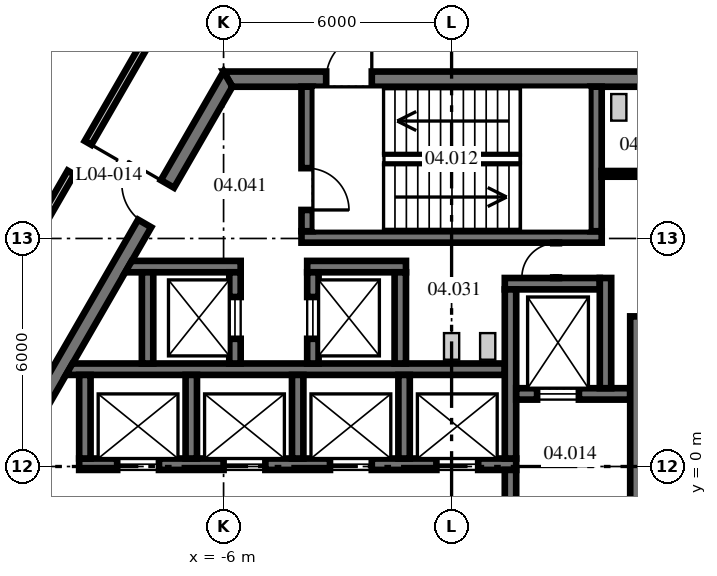
"""IFC4 building model, lengths in metres.
Left out: names, types, materials, properties, quantities, classifications, styles, units other than length and angle.
Written with IfcOpenShell. Run it as: python <this file> out.ifc"""

import sys

from ifc_helpers import new_model, si_unit, direction, frame, frame_2d, origin, place, context, subcontext, project, spatial, polyline, rectangle, outline, extrude, source, transform, mapped, element, fill, save


model = new_model("IFC4")
c1 = context("Model", 3, precision=1e-05, world=origin(), true_north=direction((0.0, 1.0)))
c2 = subcontext(c1, "Body", "Model", "MODEL_VIEW")
j1 = project(units=[si_unit("LENGTHUNIT", "METRE"), si_unit("PLANEANGLEUNIT", "RADIAN")], contexts=[c1])
p1 = place(None, origin())
s1 = spatial("IfcSite", under=j1, at=p1, CompositionType="ELEMENT")
p2 = place(p1, origin())
s2 = spatial("IfcBuilding", under=s1, at=p2, CompositionType="ELEMENT")
p3 = place(p2, frame((0.0, 0.0, 20.3)))
s3 = spatial("IfcBuildingStorey", under=s2, at=p3, CompositionType="ELEMENT", Elevation=20.3)
m1 = source(origin(), c2, "Body", "SweptSolid", [
    extrude(outline(polyline([(-0.115, -0.2), (11.885, -0.2), (11.654, 0.2), (0.115, 0.2), (-0.115, -0.2)])), origin(), (0.0, 0.0, 1.0), 4.1),
])
p4 = place(p3, frame((5.885, 10.192, 0.0), z_axis=(0.0, 0.0, 1.0), x_axis=(-1.0, 0.0, 0.0)))
e1 = element("IfcWall", 1, at=p4, inside=s3, PredefinedType="SHEAR", context=c2, shape_type="MappedRepresentation", body=[
    mapped(m1, transform((0.0, 0.0, 0.0), scale=1.0)),
])
p5 = place(p4, frame((7.985, 0.0, 0.0)))
e2 = element("IfcOpeningElement", 2, at=p5, cuts=e1, PredefinedType="OPENING", context=c2, shape_type="SweptSolid", body=[
    extrude(rectangle(XDim=1.2, YDim=2.1, at=frame_2d((0.6, 1.05))), frame((0.0, 0.21, 0.0), z_axis=(0.0, -1.0, 0.0), x_axis=(1.0, 0.0, 0.0)), (0.0, 0.0, 1.0), 0.42),
])
p6 = place(p3, frame((-5.885, 10.192, 0.0), z_axis=(0.0, 0.0, 1.0), x_axis=(-0.499996592174, -0.866027371285, 0.0)))
e3 = element("IfcWall", 3, at=p6, inside=s3, PredefinedType="SHEAR", context=c2, shape_type="MappedRepresentation", body=[
    mapped(m1, transform((0.0, 0.0, 0.0), scale=1.0)),
])
p7 = place(p6, frame((3.185, 0.0, 0.0)))
e4 = element("IfcOpeningElement", 4, at=p7, cuts=e3, PredefinedType="OPENING", context=c2, shape_type="SweptSolid", body=[
    extrude(rectangle(XDim=1.2, YDim=2.1, at=frame_2d((0.6, 1.05))), frame((0.0, 0.21, 0.0), z_axis=(0.0, -1.0, 0.0), x_axis=(1.0, 0.0, 0.0)), (0.0, 0.0, 1.0), 0.42),
])
p8 = place(p3, frame((-11.769, 0.0, 0.0), z_axis=(0.0, 0.0, 1.0), x_axis=(0.499996592174, -0.866027371285, 0.0)))
e5 = element("IfcWall", 5, at=p8, inside=s3, PredefinedType="SHEAR", context=c2, shape_type="MappedRepresentation", body=[
    mapped(m1, transform((0.0, 0.0, 0.0), scale=1.0)),
])
p9 = place(p8, frame((1.405, 0.0, 0.0)))
e6 = element("IfcOpeningElement", 6, at=p9, cuts=e5, PredefinedType="OPENING", context=c2, shape_type="SweptSolid", body=[
    extrude(rectangle(XDim=1.8, YDim=2.1, at=frame_2d((0.9, 1.05))), frame((0.0, 0.21, 0.0), z_axis=(0.0, -1.0, 0.0), x_axis=(1.0, 0.0, 0.0)), (0.0, 0.0, 1.0), 0.42),
])
p10 = place(p8, frame((7.915, 0.0, 0.0)))
e7 = element("IfcOpeningElement", 7, at=p10, cuts=e5, PredefinedType="OPENING", context=c2, shape_type="SweptSolid", body=[
    extrude(rectangle(XDim=1.2, YDim=2.1, at=frame_2d((0.6, 1.05))), frame((0.0, 0.21, 0.0), z_axis=(0.0, -1.0, 0.0), x_axis=(1.0, 0.0, 0.0)), (0.0, 0.0, 1.0), 0.42),
])
m2 = source(origin(), c2, "Body", "SweptSolid", [
    extrude(rectangle(XDim=11.5, YDim=0.3, at=frame_2d((5.75, 0.0))), origin(), (0.0, 0.0, 1.0), 4.1),
])
p11 = place(p3, frame((-9.8, 0.06, 0.0), z_axis=(0.0, 0.0, 1.0), x_axis=(1.0, 0.0, 0.0)))
e8 = element("IfcWall", 8, at=p11, inside=s3, PredefinedType="SHEAR", context=c2, shape_type="MappedRepresentation", body=[
    mapped(m2, transform((0.0, 0.0, 0.0), scale=1.0)),
])
p12 = place(p11, frame((1.0, 0.0, 0.0)))
e9 = element("IfcOpeningElement", 9, at=p12, cuts=e8, PredefinedType="OPENING", context=c2, shape_type="SweptSolid", body=[
    extrude(rectangle(XDim=1.1, YDim=2.1, at=frame_2d((0.55, 1.05))), frame((0.0, 0.16, 0.0), z_axis=(0.0, -1.0, 0.0), x_axis=(1.0, 0.0, 0.0)), (0.0, 0.0, 1.0), 0.32),
])
p13 = place(p11, frame((3.8, 0.0, 0.0)))
e10 = element("IfcOpeningElement", 10, at=p13, cuts=e8, PredefinedType="OPENING", context=c2, shape_type="SweptSolid", body=[
    extrude(rectangle(XDim=1.1, YDim=2.1, at=frame_2d((0.55, 1.05))), frame((0.0, 0.16, 0.0), z_axis=(0.0, -1.0, 0.0), x_axis=(1.0, 0.0, 0.0)), (0.0, 0.0, 1.0), 0.32),
])
p14 = place(p11, frame((6.6, 0.0, 0.0)))
e11 = element("IfcOpeningElement", 11, at=p14, cuts=e8, PredefinedType="OPENING", context=c2, shape_type="SweptSolid", body=[
    extrude(rectangle(XDim=1.1, YDim=2.1, at=frame_2d((0.55, 1.05))), frame((0.0, 0.16, 0.0), z_axis=(0.0, -1.0, 0.0), x_axis=(1.0, 0.0, 0.0)), (0.0, 0.0, 1.0), 0.32),
])
p15 = place(p11, frame((9.4, 0.0, 0.0)))
e12 = element("IfcOpeningElement", 12, at=p15, cuts=e8, PredefinedType="OPENING", context=c2, shape_type="SweptSolid", body=[
    extrude(rectangle(XDim=1.1, YDim=2.1, at=frame_2d((0.55, 1.05))), frame((0.0, 0.16, 0.0), z_axis=(0.0, -1.0, 0.0), x_axis=(1.0, 0.0, 0.0)), (0.0, 0.0, 1.0), 0.32),
])
m3 = source(origin(), c2, "Body", "SweptSolid", [
    extrude(outline(polyline([(11.2, -0.15), (-0.349, -0.15), (-0.176, 0.15), (11.2, 0.15), (11.2, -0.15)])), origin(), (0.0, 0.0, 1.0), 4.1),
])
p16 = place(p3, frame((-9.8, 2.56, 0.0), z_axis=(0.0, 0.0, 1.0), x_axis=(1.0, 0.0, 0.0)))
e13 = element("IfcWall", 13, at=p16, inside=s3, PredefinedType="SHEAR", context=c2, shape_type="MappedRepresentation", body=[
    mapped(m3, transform((0.0, 0.0, 0.0), scale=1.0)),
])
m4 = source(origin(), c2, "Body", "SweptSolid", [
    extrude(rectangle(XDim=2.5, YDim=0.3, at=frame_2d((1.25, 0.0))), origin(), (0.0, 0.0, 1.0), 4.1),
])
p17 = place(p3, frame((1.4, 4.81, 0.0), z_axis=(0.0, 0.0, 1.0), x_axis=(1.0, 0.0, 0.0)))
e14 = element("IfcWall", 14, at=p17, inside=s3, PredefinedType="SHEAR", context=c2, shape_type="MappedRepresentation", body=[
    mapped(m4, transform((0.0, 0.0, 0.0), scale=1.0)),
])
m5 = source(origin(), c2, "Body", "SweptSolid", [
    extrude(rectangle(XDim=4.45, YDim=0.3, at=frame_2d((2.225, 0.0))), origin(), (0.0, 0.0, 1.0), 4.1),
])
p18 = place(p3, frame((1.55, 0.21, 0.0), z_axis=(0.0, 0.0, 1.0), x_axis=(0.0, 1.0, 0.0)))
e15 = element("IfcWall", 15, at=p18, inside=s3, PredefinedType="SHEAR", context=c2, shape_type="MappedRepresentation", body=[
    mapped(m5, transform((0.0, 0.0, 0.0), scale=1.0)),
])
m6 = source(origin(), c2, "Body", "SweptSolid", [
    extrude(rectangle(XDim=3.0, YDim=0.3, at=frame_2d((1.5, 0.0))), origin(), (0.0, 0.0, 1.0), 4.1),
])
p19 = place(p3, frame((1.7, 1.91, 0.0), z_axis=(0.0, 0.0, 1.0), x_axis=(1.0, 0.0, 0.0)))
e16 = element("IfcWall", 16, at=p19, inside=s3, PredefinedType="SHEAR", context=c2, shape_type="MappedRepresentation", body=[
    mapped(m6, transform((0.0, 0.0, 0.0), scale=1.0)),
])
p20 = place(p19, frame((0.55, 0.0, 0.0)))
e17 = element("IfcOpeningElement", 17, at=p20, cuts=e16, PredefinedType="OPENING", context=c2, shape_type="SweptSolid", body=[
    extrude(rectangle(XDim=1.1, YDim=2.1, at=frame_2d((0.55, 1.05))), frame((0.0, 0.16, 0.0), z_axis=(0.0, -1.0, 0.0), x_axis=(1.0, 0.0, 0.0)), (0.0, 0.0, 1.0), 0.32),
])
m7 = source(origin(), c2, "Body", "SweptSolid", [
    extrude(rectangle(XDim=2.9, YDim=0.3, at=frame_2d((1.45, 0.0))), origin(), (0.0, 0.0, 1.0), 4.1),
])
p21 = place(p3, frame((4.05, 2.06, 0.0), z_axis=(0.0, 0.0, 1.0), x_axis=(0.0, 1.0, 0.0)))
e18 = element("IfcWall", 18, at=p21, inside=s3, PredefinedType="SHEAR", context=c2, shape_type="MappedRepresentation", body=[
    mapped(m7, transform((0.0, 0.0, 0.0), scale=1.0)),
])
m8 = source(origin(), c2, "Body", "SweptSolid", [
    extrude(rectangle(XDim=2.2, YDim=0.3, at=frame_2d((1.1, 0.0))), origin(), (0.0, 0.0, 1.0), 4.1),
])
p22 = place(p3, frame((-9.65, 0.21, 0.0), z_axis=(0.0, 0.0, 1.0), x_axis=(0.0, 1.0, 0.0)))
e19 = element("IfcWall", 19, at=p22, inside=s3, PredefinedType="SHEAR", context=c2, shape_type="MappedRepresentation", body=[
    mapped(m8, transform((0.0, 0.0, 0.0), scale=1.0)),
])
p23 = place(p3, frame((1.55, -3.09, 0.0), z_axis=(0.0, 0.0, 1.0), x_axis=(0.0, 1.0, 0.0)))
e20 = element("IfcWall", 20, at=p23, inside=s3, PredefinedType="SHEAR", context=c2, shape_type="MappedRepresentation", body=[
    mapped(m6, transform((0.0, 0.0, 0.0), scale=1.0)),
])
p24 = place(p23, frame((0.9, 0.0, 0.0)))
e21 = element("IfcOpeningElement", 21, at=p24, cuts=e20, PredefinedType="OPENING", context=c2, shape_type="SweptSolid", body=[
    extrude(rectangle(XDim=1.2, YDim=2.1, at=frame_2d((0.6, 1.05))), frame((0.0, 0.16, 0.0), z_axis=(0.0, -1.0, 0.0), x_axis=(1.0, 0.0, 0.0)), (0.0, 0.0, 1.0), 0.32),
])
m9 = source(origin(), c2, "Body", "SweptSolid", [
    extrude(outline(polyline([(-0.15, -0.15), (9.99, -0.15), (9.99, 0.15), (0.15, 0.15), (-0.15, -0.15)])), origin(), (0.0, 0.0, 1.0), 4.1),
])
p25 = place(p3, frame((4.85, -6.04, 0.0), z_axis=(0.0, 0.0, 1.0), x_axis=(0.0, 1.0, 0.0)))
e22 = element("IfcWall", 22, at=p25, inside=s3, PredefinedType="SHEAR", context=c2, shape_type="MappedRepresentation", body=[
    mapped(m9, transform((0.0, 0.0, 0.0), scale=1.0)),
])
p26 = place(p25, frame((3.19, 0.0, 0.0)))
e23 = element("IfcOpeningElement", 23, at=p26, cuts=e22, PredefinedType="OPENING", context=c2, shape_type="SweptSolid", body=[
    extrude(rectangle(XDim=1.1, YDim=2.1, at=frame_2d((0.55, 1.05))), frame((0.0, 0.16, 0.0), z_axis=(0.0, -1.0, 0.0), x_axis=(1.0, 0.0, 0.0)), (0.0, 0.0, 1.0), 0.32),
])
m10 = source(origin(), c2, "Body", "SweptSolid", [
    extrude(rectangle(XDim=7.9, YDim=0.3, at=frame_2d((3.95, 0.0))), origin(), (0.0, 0.0, 1.0), 4.1),
])
p27 = place(p3, frame((-3.95, 6.04, 0.0), z_axis=(0.0, 0.0, 1.0), x_axis=(1.0, 0.0, 0.0)))
e24 = element("IfcWall", 24, at=p27, inside=s3, PredefinedType="SHEAR", context=c2, shape_type="MappedRepresentation", body=[
    mapped(m10, transform((0.0, 0.0, 0.0), scale=1.0)),
])
m11 = source(origin(), c2, "Body", "SweptSolid", [
    extrude(outline(polyline([(0.0, -0.15), (0.0, 0.15), (3.804, 0.15), (3.804, -0.15), (0.0, -0.15)])), origin(), (0.0, 0.0, 1.0), 4.1),
])
p28 = place(p3, frame((-3.8, 6.19, 0.0), z_axis=(0.0, 0.0, 1.0), x_axis=(0.0, 1.0, 0.0)))
e25 = element("IfcWall", 25, at=p28, inside=s3, PredefinedType="SHEAR", context=c2, shape_type="MappedRepresentation", body=[
    mapped(m11, transform((0.0, 0.0, 0.0), scale=1.0)),
])
p29 = place(p28, frame((0.56, 0.0, 0.0)))
e26 = element("IfcOpeningElement", 26, at=p29, cuts=e25, PredefinedType="OPENING", context=c2, shape_type="SweptSolid", body=[
    extrude(rectangle(XDim=1.1, YDim=2.1, at=frame_2d((0.55, 1.05))), frame((0.0, 0.16, 0.0), z_axis=(0.0, -1.0, 0.0), x_axis=(1.0, 0.0, 0.0)), (0.0, 0.0, 1.0), 0.32),
])
p30 = place(p3, frame((3.8, 6.19, 0.0), z_axis=(0.0, 0.0, 1.0), x_axis=(0.0, 1.0, 0.0)))
e27 = element("IfcWall", 27, at=p30, inside=s3, PredefinedType="SHEAR", context=c2, shape_type="MappedRepresentation", body=[
    mapped(m11, transform((0.0, 0.0, 0.0), scale=1.0)),
])
m12 = source(origin(), c2, "Body", "SweptSolid", [
    extrude(outline(polyline([(2.6, -0.15), (-0.44, -0.15), (-0.267, 0.15), (2.6, 0.15), (2.6, -0.15)])), origin(), (0.0, 0.0, 1.0), 4.1),
])
p31 = place(p3, frame((-8.15, 5.26, 0.0), z_axis=(0.0, 0.0, 1.0), x_axis=(1.0, 0.0, 0.0)))
e28 = element("IfcWall", 28, at=p31, inside=s3, PredefinedType="SHEAR", context=c2, shape_type="MappedRepresentation", body=[
    mapped(m12, transform((0.0, 0.0, 0.0), scale=1.0)),
])
m13 = source(origin(), c2, "Body", "SweptSolid", [
    extrude(rectangle(XDim=2.4, YDim=0.3, at=frame_2d((1.2, 0.0))), origin(), (0.0, 0.0, 1.0), 4.1),
])
p32 = place(p3, frame((-8.0, 2.71, 0.0), z_axis=(0.0, 0.0, 1.0), x_axis=(0.0, 1.0, 0.0)))
e29 = element("IfcWall", 29, at=p32, inside=s3, PredefinedType="SHEAR", context=c2, shape_type="MappedRepresentation", body=[
    mapped(m13, transform((0.0, 0.0, 0.0), scale=1.0)),
])
p33 = place(p3, frame((-5.7, 2.71, 0.0), z_axis=(0.0, 0.0, 1.0), x_axis=(0.0, 1.0, 0.0)))
e30 = element("IfcWall", 30, at=p33, inside=s3, PredefinedType="SHEAR", context=c2, shape_type="MappedRepresentation", body=[
    mapped(m13, transform((0.0, 0.0, 0.0), scale=1.0)),
])
p34 = place(p33, frame((0.65, 0.0, 0.0)))
e31 = element("IfcOpeningElement", 31, at=p34, cuts=e30, PredefinedType="OPENING", context=c2, shape_type="SweptSolid", body=[
    extrude(rectangle(XDim=1.1, YDim=2.1, at=frame_2d((0.55, 1.05))), frame((0.0, 0.16, 0.0), z_axis=(0.0, -1.0, 0.0), x_axis=(1.0, 0.0, 0.0)), (0.0, 0.0, 1.0), 0.32),
])
m14 = source(origin(), c2, "Body", "SweptSolid", [
    extrude(rectangle(XDim=2.6, YDim=0.3, at=frame_2d((1.3, 0.0))), origin(), (0.0, 0.0, 1.0), 4.1),
])
p35 = place(p3, frame((-3.8, 5.26, 0.0), z_axis=(0.0, 0.0, 1.0), x_axis=(1.0, 0.0, 0.0)))
e32 = element("IfcWall", 32, at=p35, inside=s3, PredefinedType="SHEAR", context=c2, shape_type="MappedRepresentation", body=[
    mapped(m14, transform((0.0, 0.0, 0.0), scale=1.0)),
])
p36 = place(p3, frame((-3.65, 2.71, 0.0), z_axis=(0.0, 0.0, 1.0), x_axis=(0.0, 1.0, 0.0)))
e33 = element("IfcWall", 33, at=p36, inside=s3, PredefinedType="SHEAR", context=c2, shape_type="MappedRepresentation", body=[
    mapped(m13, transform((0.0, 0.0, 0.0), scale=1.0)),
])
p37 = place(p36, frame((0.65, 0.0, 0.0)))
e34 = element("IfcOpeningElement", 34, at=p37, cuts=e33, PredefinedType="OPENING", context=c2, shape_type="SweptSolid", body=[
    extrude(rectangle(XDim=1.1, YDim=2.1, at=frame_2d((0.55, 1.05))), frame((0.0, 0.16, 0.0), z_axis=(0.0, -1.0, 0.0), x_axis=(1.0, 0.0, 0.0)), (0.0, 0.0, 1.0), 0.32),
])
p38 = place(p3, frame((-1.35, 2.71, 0.0), z_axis=(0.0, 0.0, 1.0), x_axis=(0.0, 1.0, 0.0)))
e35 = element("IfcWall", 35, at=p38, inside=s3, PredefinedType="SHEAR", context=c2, shape_type="MappedRepresentation", body=[
    mapped(m13, transform((0.0, 0.0, 0.0), scale=1.0)),
])
for number, where, z_axis, x_axis in (
    (36, (-6.85, 0.21, 0.0), (0.0, 0.0, 1.0), (0.0, 1.0, 0.0)),
    (37, (-4.05, 0.21, 0.0), (0.0, 0.0, 1.0), (0.0, 1.0, 0.0)),
    (38, (-1.25, 0.21, 0.0), (0.0, 0.0, 1.0), (0.0, 1.0, 0.0)),
):
    element("IfcWall", number, at=place(p3, frame(where, z_axis=z_axis, x_axis=x_axis)), inside=s3, PredefinedType="SHEAR", context=c2, shape_type="MappedRepresentation", body=[
        mapped(m8, transform((0.0, 0.0, 0.0), scale=1.0)),
    ])
m15 = source(origin(), c2, "Body", "SweptSolid", [
    extrude(outline(polyline([(0.0, -0.075), (0.0, 0.075), (3.102, 0.075), (3.188, -0.075), (0.0, -0.075)])), origin(), (0.0, 0.0, 1.0), 4.1),
])
p39 = place(p3, frame((3.95, 7.7, 0.0), z_axis=(0.0, 0.0, 1.0), x_axis=(1.0, 0.0, 0.0)))
e39 = element("IfcWall", 39, at=p39, inside=s3, PredefinedType="PARTITIONING", context=c2, shape_type="MappedRepresentation", body=[
    mapped(m15, transform((0.0, 0.0, 0.0), scale=1.0)),
])
p40 = place(p39, frame((1.6, 0.0, 0.0)))
e40 = element("IfcOpeningElement", 40, at=p40, cuts=e39, PredefinedType="OPENING", context=c2, shape_type="SweptSolid", body=[
    extrude(rectangle(XDim=0.9, YDim=2.1, at=frame_2d((0.45, 1.05))), frame((0.0, 0.085, 0.0), z_axis=(0.0, -1.0, 0.0), x_axis=(1.0, 0.0, 0.0)), (0.0, 0.0, 1.0), 0.17),
])
m16 = source(origin(), c2, "Body", "SweptSolid", [
    extrude(rectangle(XDim=0.93, YDim=0.15, at=frame_2d((0.465, 0.0))), origin(), (0.0, 0.0, 1.0), 4.1),
])
p41 = place(p3, frame((2.75, 4.96, 0.0), z_axis=(0.0, 0.0, 1.0), x_axis=(0.0, 1.0, 0.0)))
e41 = element("IfcWall", 41, at=p41, inside=s3, PredefinedType="PARTITIONING", context=c2, shape_type="MappedRepresentation", body=[
    mapped(m16, transform((0.0, 0.0, 0.0), scale=1.0)),
])
p42 = place(p41, frame((0.015, 0.0, 0.0)))
e42 = element("IfcOpeningElement", 42, at=p42, cuts=e41, PredefinedType="OPENING", context=c2, shape_type="SweptSolid", body=[
    extrude(rectangle(XDim=0.9, YDim=2.1, at=frame_2d((0.45, 1.05))), frame((0.0, 0.085, 0.0), z_axis=(0.0, -1.0, 0.0), x_axis=(1.0, 0.0, 0.0)), (0.0, 0.0, 1.0), 0.17),
])
m17 = source(origin(), c2, "Body", "SweptSolid", [
    extrude(rectangle(XDim=10.082, YDim=0.2, at=frame_2d((5.041, 0.0))), origin(), (0.0, 0.0, 1.0), 4.1),
])
p43 = place(p3, frame((-12.307, 3.768, 0.0), z_axis=(0.0, 0.0, 1.0), x_axis=(0.500014523669, 0.866017018378, 0.0)))
e43 = element("IfcWall", 43, at=p43, inside=s3, PredefinedType="PARTITIONING", context=c2, shape_type="MappedRepresentation", body=[
    mapped(m17, transform((0.0, 0.0, 0.0), scale=1.0)),
])
p44 = place(p43, frame((4.582, 0.0, 0.0)))
e44 = element("IfcOpeningElement", 44, at=p44, cuts=e43, PredefinedType="OPENING", context=c2, shape_type="SweptSolid", body=[
    extrude(rectangle(XDim=0.9, YDim=2.1, at=frame_2d((0.45, 1.05))), frame((0.0, 0.11, 0.0), z_axis=(0.0, -1.0, 0.0), x_axis=(1.0, 0.0, 0.0)), (0.0, 0.0, 1.0), 0.22),
])
p45 = place(p5, frame((1.2, 0.0, 0.0), z_axis=(0.0, 0.0, 1.0), x_axis=(-1.0, 0.0, 0.0)))
e45 = element("IfcDoor", 45, at=p45, inside=s3, OperationType="SINGLE_SWING_RIGHT", PredefinedType="DOOR", context=c2, shape_type="SweptSolid", body=[
    extrude(rectangle(XDim=1.2, YDim=2.1, at=frame_2d((0.6, 1.05))), frame((0.0, 0.025, 0.0), z_axis=(0.0, -1.0, 0.0), x_axis=(1.0, 0.0, 0.0)), (0.0, 0.0, 1.0), 0.05),
])
fill(e2, e45)
p46 = place(p7, frame((1.2, 0.0, 0.0), z_axis=(0.0, 0.0, 1.0), x_axis=(-1.0, 0.0, 0.0)))
e46 = element("IfcDoor", 46, at=p46, inside=s3, OperationType="SINGLE_SWING_RIGHT", PredefinedType="DOOR", context=c2, shape_type="SweptSolid", body=[
    extrude(rectangle(XDim=1.2, YDim=2.1, at=frame_2d((0.6, 1.05))), frame((0.0, 0.025, 0.0), z_axis=(0.0, -1.0, 0.0), x_axis=(1.0, 0.0, 0.0)), (0.0, 0.0, 1.0), 0.05),
])
fill(e4, e46)
p47 = place(p29, frame((1.1, 0.0, 0.0), z_axis=(0.0, 0.0, 1.0), x_axis=(-1.0, 0.0, 0.0)))
e47 = element("IfcDoor", 47, at=p47, inside=s3, OperationType="SINGLE_SWING_RIGHT", PredefinedType="DOOR", context=c2, shape_type="SweptSolid", body=[
    extrude(rectangle(XDim=1.1, YDim=2.1, at=frame_2d((0.55, 1.05))), frame((0.0, 0.025, 0.0), z_axis=(0.0, -1.0, 0.0), x_axis=(1.0, 0.0, 0.0)), (0.0, 0.0, 1.0), 0.05),
])
fill(e26, e47)
p48 = place(p42, origin())
e48 = element("IfcDoor", 48, at=p48, inside=s3, OperationType="SINGLE_SWING_LEFT", PredefinedType="DOOR", context=c2, shape_type="SweptSolid", body=[
    extrude(rectangle(XDim=0.9, YDim=2.1, at=frame_2d((0.45, 1.05))), frame((0.0, 0.025, 0.0), z_axis=(0.0, -1.0, 0.0), x_axis=(1.0, 0.0, 0.0)), (0.0, 0.0, 1.0), 0.05),
])
fill(e42, e48)
p49 = place(p12, origin())
e49 = element("IfcDoor", 49, at=p49, inside=s3, OperationType="DOUBLE_DOOR_SLIDING", PredefinedType="DOOR", context=c2, shape_type="SweptSolid", body=[
    extrude(rectangle(XDim=1.1, YDim=2.1, at=frame_2d((0.55, 1.05))), frame((0.0, 0.025, 0.0), z_axis=(0.0, -1.0, 0.0), x_axis=(1.0, 0.0, 0.0)), (0.0, 0.0, 1.0), 0.05),
])
fill(e9, e49)
p50 = place(p13, origin())
e50 = element("IfcDoor", 50, at=p50, inside=s3, OperationType="DOUBLE_DOOR_SLIDING", PredefinedType="DOOR", context=c2, shape_type="SweptSolid", body=[
    extrude(rectangle(XDim=1.1, YDim=2.1, at=frame_2d((0.55, 1.05))), frame((0.0, 0.025, 0.0), z_axis=(0.0, -1.0, 0.0), x_axis=(1.0, 0.0, 0.0)), (0.0, 0.0, 1.0), 0.05),
])
fill(e10, e50)
p51 = place(p14, origin())
e51 = element("IfcDoor", 51, at=p51, inside=s3, OperationType="DOUBLE_DOOR_SLIDING", PredefinedType="DOOR", context=c2, shape_type="SweptSolid", body=[
    extrude(rectangle(XDim=1.1, YDim=2.1, at=frame_2d((0.55, 1.05))), frame((0.0, 0.025, 0.0), z_axis=(0.0, -1.0, 0.0), x_axis=(1.0, 0.0, 0.0)), (0.0, 0.0, 1.0), 0.05),
])
fill(e11, e51)
p52 = place(p15, origin())
e52 = element("IfcDoor", 52, at=p52, inside=s3, OperationType="DOUBLE_DOOR_SLIDING", PredefinedType="DOOR", context=c2, shape_type="SweptSolid", body=[
    extrude(rectangle(XDim=1.1, YDim=2.1, at=frame_2d((0.55, 1.05))), frame((0.0, 0.025, 0.0), z_axis=(0.0, -1.0, 0.0), x_axis=(1.0, 0.0, 0.0)), (0.0, 0.0, 1.0), 0.05),
])
fill(e12, e52)
p53 = place(p20, origin())
e53 = element("IfcDoor", 53, at=p53, inside=s3, OperationType="DOUBLE_DOOR_SLIDING", PredefinedType="DOOR", context=c2, shape_type="SweptSolid", body=[
    extrude(rectangle(XDim=1.1, YDim=2.1, at=frame_2d((0.55, 1.05))), frame((0.0, 0.025, 0.0), z_axis=(0.0, -1.0, 0.0), x_axis=(1.0, 0.0, 0.0)), (0.0, 0.0, 1.0), 0.05),
])
fill(e17, e53)
p54 = place(p34, origin())
e54 = element("IfcDoor", 54, at=p54, inside=s3, OperationType="DOUBLE_DOOR_SLIDING", PredefinedType="DOOR", context=c2, shape_type="SweptSolid", body=[
    extrude(rectangle(XDim=1.1, YDim=2.1, at=frame_2d((0.55, 1.05))), frame((0.0, 0.025, 0.0), z_axis=(0.0, -1.0, 0.0), x_axis=(1.0, 0.0, 0.0)), (0.0, 0.0, 1.0), 0.05),
])
fill(e31, e54)
p55 = place(p37, origin())
e55 = element("IfcDoor", 55, at=p55, inside=s3, OperationType="DOUBLE_DOOR_SLIDING", PredefinedType="DOOR", context=c2, shape_type="SweptSolid", body=[
    extrude(rectangle(XDim=1.1, YDim=2.1, at=frame_2d((0.55, 1.05))), frame((0.0, 0.025, 0.0), z_axis=(0.0, -1.0, 0.0), x_axis=(1.0, 0.0, 0.0)), (0.0, 0.0, 1.0), 0.05),
])
fill(e34, e55)
p56 = place(p44, origin())
e56 = element("IfcDoor", 56, at=p56, inside=s3, OperationType="SINGLE_SWING_RIGHT", PredefinedType="DOOR", context=c2, shape_type="SweptSolid", body=[
    extrude(rectangle(XDim=0.9, YDim=2.1, at=frame_2d((0.45, 1.05))), frame((0.0, 0.025, 0.0), z_axis=(0.0, -1.0, 0.0), x_axis=(1.0, 0.0, 0.0)), (0.0, 0.0, 1.0), 0.05),
])
fill(e44, e56)
save(model, sys.argv[1])
